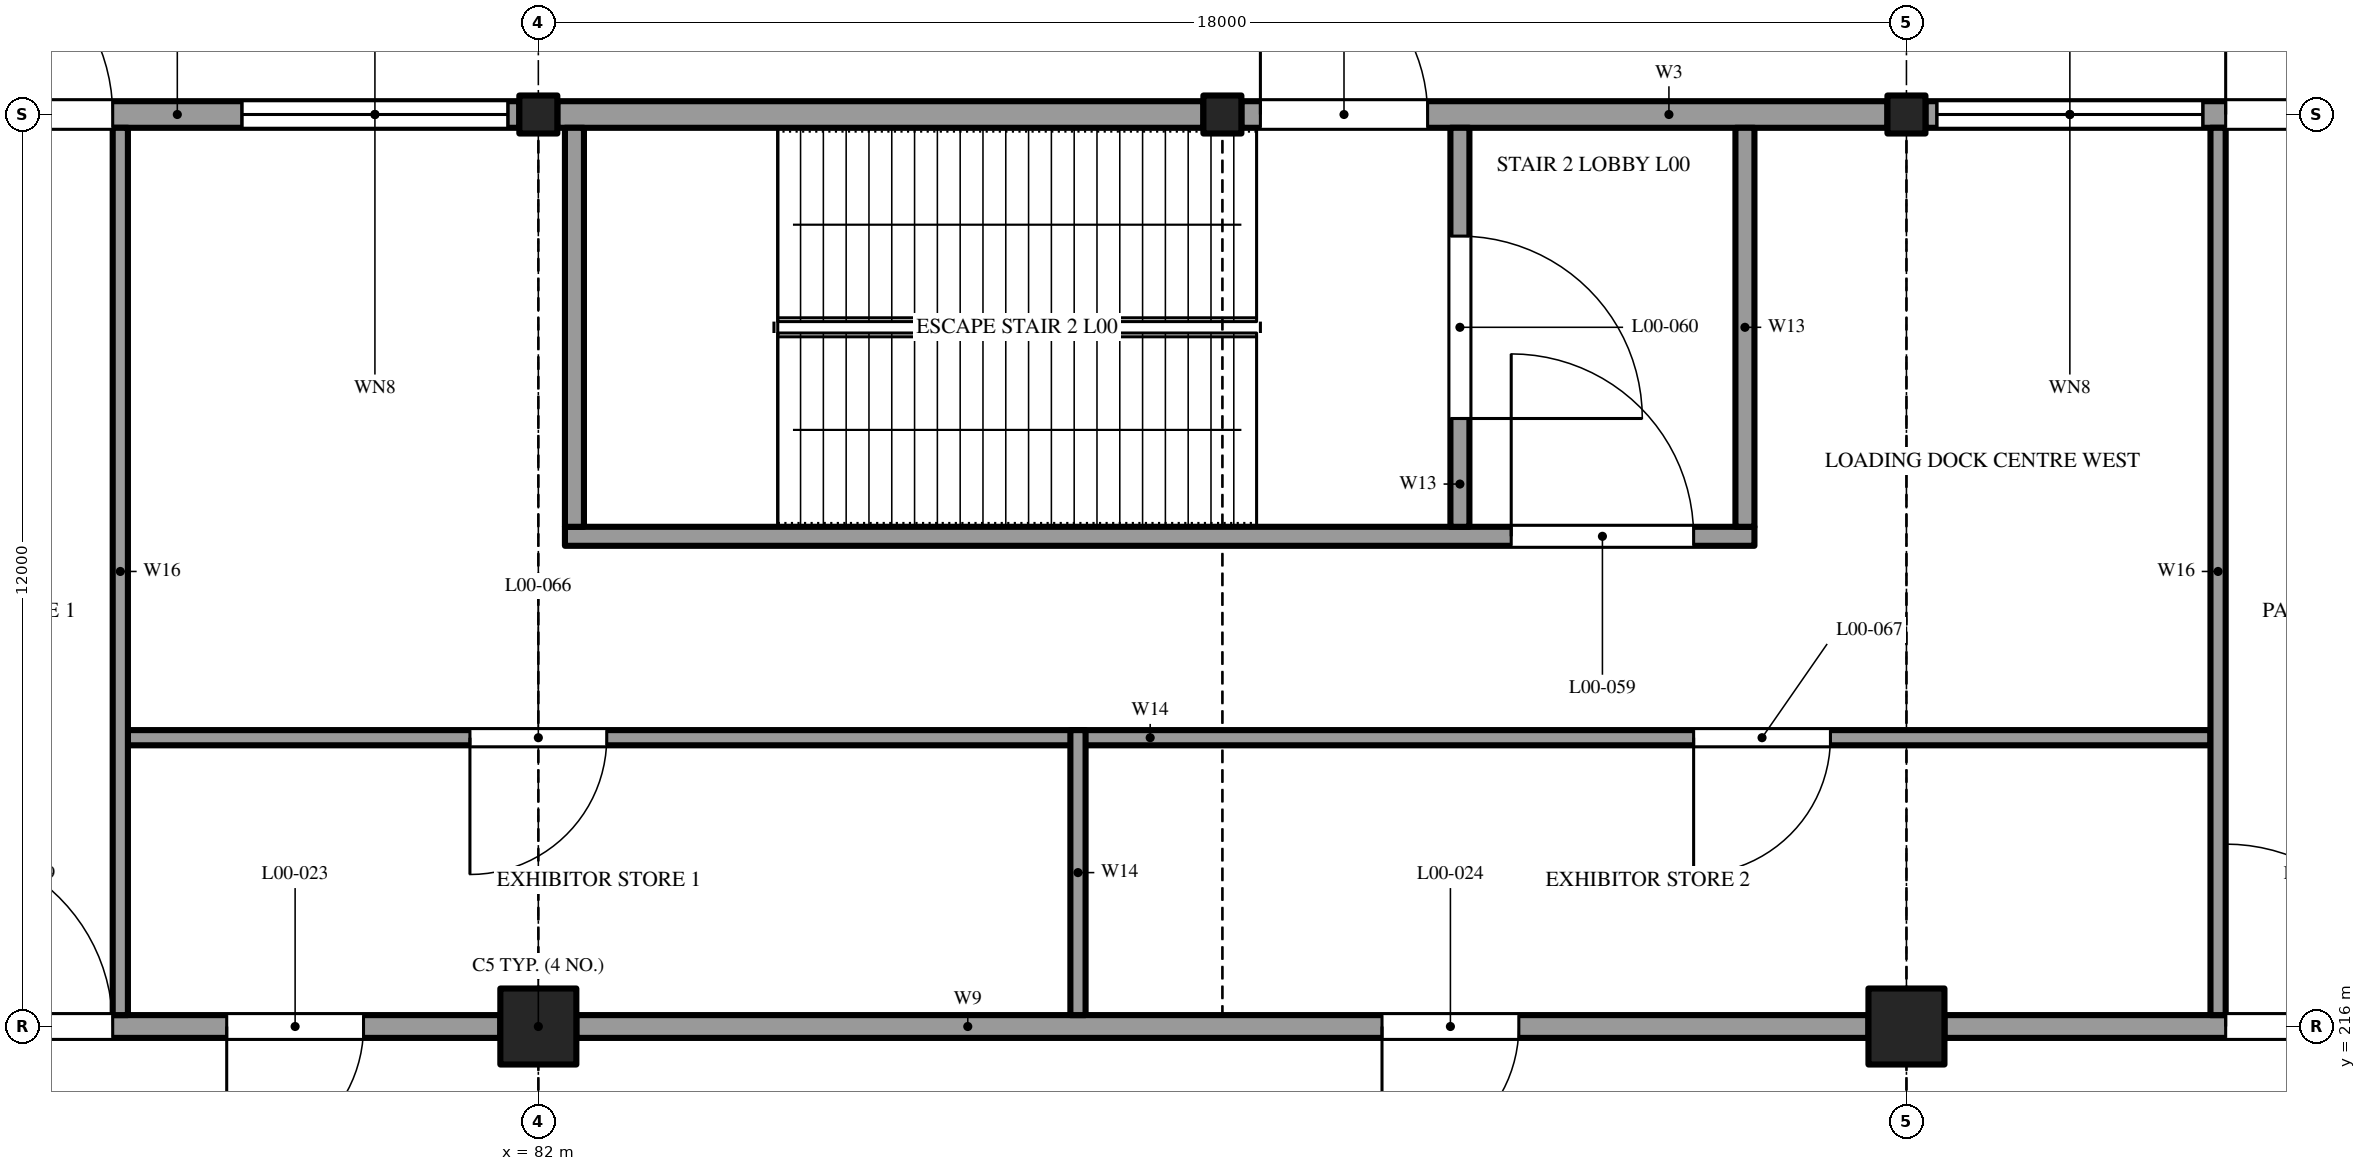
"""IFC4 building model, lengths in metres.
Left out: names, types, materials, properties, quantities, classifications, styles, units other than length and angle.
Written with IfcOpenShell. Run it as: python <this file> out.ifc"""

import sys

from ifc_helpers import new_model, si_unit, direction, frame, frame_2d, origin, origin_2d, place, context, subcontext, project, spatial, rectangle, extrude, element, fill, save


model = new_model("IFC4")
c1 = context("Model", 3, precision=1e-05, world=origin(), true_north=direction((0.0, 1.0)))
c2 = subcontext(c1, "Body", "Model", "MODEL_VIEW")
j1 = project(units=[si_unit("LENGTHUNIT", "METRE"), si_unit("PLANEANGLEUNIT", "RADIAN")], contexts=[c1])
p1 = place(None, origin())
s1 = spatial("IfcSite", under=j1, at=p1, CompositionType="ELEMENT")
p2 = place(p1, origin())
s2 = spatial("IfcBuilding", under=s1, at=p2, CompositionType="ELEMENT")
p3 = place(p2, origin())
s3 = spatial("IfcBuildingStorey", under=s2, at=p3, CompositionType="ELEMENT", Elevation=0.0)
for number, where, z_axis, x_axis in (
    (1, (82.0, 216.0, -0.4), (0.0, 0.0, 1.0), (1.0, 0.0, 0.0)),
    (2, (100.0, 216.0, -0.4), (0.0, 0.0, 1.0), (1.0, 0.0, 0.0)),
):
    element("IfcColumn", number, at=place(p3, frame(where, z_axis=z_axis, x_axis=x_axis)), inside=s3, PredefinedType="COLUMN", context=c2, shape_type="SweptSolid", body=[
        extrude(rectangle(XDim=1.0, YDim=1.0, at=origin_2d()), origin(), (0.0, 0.0, 1.0), 7.6),
    ])
for number, where, z_axis, x_axis in (
    (3, (82.0, 228.0, -0.4), (0.0, 0.0, 1.0), (1.0, 0.0, 0.0)),
    (4, (91.0, 228.0, -0.4), (0.0, 0.0, 1.0), (1.0, 0.0, 0.0)),
    (5, (100.0, 228.0, -0.4), (0.0, 0.0, 1.0), (1.0, 0.0, 0.0)),
):
    element("IfcColumn", number, at=place(p3, frame(where, z_axis=z_axis, x_axis=x_axis)), inside=s3, PredefinedType="COLUMN", context=c2, shape_type="SweptSolid", body=[
        extrude(rectangle(XDim=0.5, YDim=0.5, at=origin_2d()), origin(), (0.0, 0.0, 1.0), 7.6),
    ])
p4 = place(p3, frame((64.5, 216.0, 0.0), z_axis=(0.0, 0.0, 1.0), x_axis=(1.0, 0.0, 0.0)))
e6 = element("IfcWall", 6, at=p4, inside=s3, PredefinedType="SOLIDWALL", context=c2, shape_type="SweptSolid", body=[
    extrude(rectangle(XDim=17.0, YDim=0.3, at=frame_2d((8.5, 0.0))), origin(), (0.0, 0.0, 1.0), 6.8),
])
p5 = place(p4, frame((13.4, 0.0, 0.0)))
e7 = element("IfcOpeningElement", 7, at=p5, cuts=e6, PredefinedType="OPENING", context=c2, shape_type="SweptSolid", body=[
    extrude(rectangle(XDim=1.8, YDim=2.4, at=frame_2d((0.9, 1.2))), frame((0.0, 0.16, 0.0), z_axis=(0.0, -1.0, 0.0), x_axis=(1.0, 0.0, 0.0)), (0.0, 0.0, 1.0), 0.32),
])
p6 = place(p4, frame((1.5, 0.0, 0.0)))
e8 = element("IfcOpeningElement", 8, at=p6, cuts=e6, PredefinedType="OPENING", context=c2, shape_type="SweptSolid", body=[
    extrude(rectangle(XDim=5.0, YDim=5.5, at=frame_2d((2.5, 2.75))), frame((0.0, 0.16, 0.0), z_axis=(0.0, -1.0, 0.0), x_axis=(1.0, 0.0, 0.0)), (0.0, 0.0, 1.0), 0.32),
])
p7 = place(p4, frame((9.5, 0.0, 0.0)))
e9 = element("IfcOpeningElement", 9, at=p7, cuts=e6, PredefinedType="OPENING", context=c2, shape_type="SweptSolid", body=[
    extrude(rectangle(XDim=2.4, YDim=2.4, at=frame_2d((1.2, 1.2))), frame((0.0, 0.16, 0.0), z_axis=(0.0, -1.0, 0.0), x_axis=(1.0, 0.0, 0.0)), (0.0, 0.0, 1.0), 0.32),
])
p8 = place(p3, frame((82.5, 216.0, 0.0), z_axis=(0.0, 0.0, 1.0), x_axis=(1.0, 0.0, 0.0)))
e10 = element("IfcWall", 10, at=p8, inside=s3, PredefinedType="SOLIDWALL", context=c2, shape_type="SweptSolid", body=[
    extrude(rectangle(XDim=17.0, YDim=0.3, at=frame_2d((8.5, 0.0))), origin(), (0.0, 0.0, 1.0), 6.8),
])
p9 = place(p8, frame((10.6, 0.0, 0.0)))
e11 = element("IfcOpeningElement", 11, at=p9, cuts=e10, PredefinedType="OPENING", context=c2, shape_type="SweptSolid", body=[
    extrude(rectangle(XDim=1.8, YDim=2.4, at=frame_2d((0.9, 1.2))), frame((0.0, 0.16, 0.0), z_axis=(0.0, -1.0, 0.0), x_axis=(1.0, 0.0, 0.0)), (0.0, 0.0, 1.0), 0.32),
])
p10 = place(p3, frame((100.5, 216.0, 0.0), z_axis=(0.0, 0.0, 1.0), x_axis=(1.0, 0.0, 0.0)))
e12 = element("IfcWall", 12, at=p10, inside=s3, PredefinedType="SOLIDWALL", context=c2, shape_type="SweptSolid", body=[
    extrude(rectangle(XDim=17.0, YDim=0.3, at=frame_2d((8.5, 0.0))), origin(), (0.0, 0.0, 1.0), 6.8),
])
p11 = place(p10, frame((10.6, 0.0, 0.0)))
e13 = element("IfcOpeningElement", 13, at=p11, cuts=e12, PredefinedType="OPENING", context=c2, shape_type="SweptSolid", body=[
    extrude(rectangle(XDim=1.8, YDim=2.4, at=frame_2d((0.9, 1.2))), frame((0.0, 0.16, 0.0), z_axis=(0.0, -1.0, 0.0), x_axis=(1.0, 0.0, 0.0)), (0.0, 0.0, 1.0), 0.32),
])
p12 = place(p10, frame((3.7, 0.0, 0.0)))
e14 = element("IfcOpeningElement", 14, at=p12, cuts=e12, PredefinedType="OPENING", context=c2, shape_type="SweptSolid", body=[
    extrude(rectangle(XDim=2.4, YDim=2.4, at=frame_2d((1.2, 1.2))), frame((0.0, 0.16, 0.0), z_axis=(0.0, -1.0, 0.0), x_axis=(1.0, 0.0, 0.0)), (0.0, 0.0, 1.0), 0.32),
])
p13 = place(p3, frame((73.25, 228.0, 0.0), z_axis=(0.0, 0.0, 1.0), x_axis=(1.0, 0.0, 0.0)))
e15 = element("IfcWall", 15, at=p13, inside=s3, PredefinedType="SOLIDWALL", context=c2, shape_type="SweptSolid", body=[
    extrude(rectangle(XDim=8.5, YDim=0.35, at=frame_2d((4.25, 0.0))), origin(), (0.0, 0.0, 1.0), 6.8),
])
p14 = place(p13, frame((4.85, 0.0, 0.0)))
e16 = element("IfcOpeningElement", 16, at=p14, cuts=e15, PredefinedType="OPENING", context=c2, shape_type="SweptSolid", body=[
    extrude(rectangle(XDim=3.5, YDim=4.2, at=frame_2d((1.75, 2.1))), frame((0.0, 0.185, 0.0), z_axis=(0.0, -1.0, 0.0), x_axis=(1.0, 0.0, 0.0)), (0.0, 0.0, 1.0), 0.37),
])
p15 = place(p13, frame((4.85, 0.0, 4.9)))
e17 = element("IfcOpeningElement", 17, at=p15, cuts=e15, PredefinedType="OPENING", context=c2, shape_type="SweptSolid", body=[
    extrude(rectangle(XDim=3.5, YDim=1.7, at=frame_2d((1.75, 0.85))), frame((0.0, 0.185, 0.0), z_axis=(0.0, -1.0, 0.0), x_axis=(1.0, 0.0, 0.0)), (0.0, 0.0, 1.0), 0.37),
])
p16 = place(p13, frame((0.75, 0.0, 0.0)))
e18 = element("IfcOpeningElement", 18, at=p16, cuts=e15, PredefinedType="OPENING", context=c2, shape_type="SweptSolid", body=[
    extrude(rectangle(XDim=2.4, YDim=2.2, at=frame_2d((1.2, 1.1))), frame((0.0, 0.185, 0.0), z_axis=(0.0, -1.0, 0.0), x_axis=(1.0, 0.0, 0.0)), (0.0, 0.0, 1.0), 0.37),
])
p17 = place(p3, frame((82.25, 228.0, 0.0), z_axis=(0.0, 0.0, 1.0), x_axis=(1.0, 0.0, 0.0)))
e19 = element("IfcWall", 19, at=p17, inside=s3, PredefinedType="SOLIDWALL", context=c2, shape_type="SweptSolid", body=[
    extrude(rectangle(XDim=8.5, YDim=0.35, at=frame_2d((4.25, 0.0))), origin(), (0.0, 0.0, 1.0), 6.8),
])
p18 = place(p3, frame((91.25, 228.0, 0.0), z_axis=(0.0, 0.0, 1.0), x_axis=(1.0, 0.0, 0.0)))
e20 = element("IfcWall", 20, at=p18, inside=s3, PredefinedType="SOLIDWALL", context=c2, shape_type="SweptSolid", body=[
    extrude(rectangle(XDim=8.5, YDim=0.35, at=frame_2d((4.25, 0.0))), origin(), (0.0, 0.0, 1.0), 6.8),
])
p19 = place(p18, frame((0.25, 0.0, 0.0)))
e21 = element("IfcOpeningElement", 21, at=p19, cuts=e20, PredefinedType="OPENING", context=c2, shape_type="SweptSolid", body=[
    extrude(rectangle(XDim=2.2, YDim=2.2, at=frame_2d((1.1, 1.1))), frame((0.0, 0.185, 0.0), z_axis=(0.0, -1.0, 0.0), x_axis=(1.0, 0.0, 0.0)), (0.0, 0.0, 1.0), 0.37),
])
p20 = place(p3, frame((100.25, 228.0, 0.0), z_axis=(0.0, 0.0, 1.0), x_axis=(1.0, 0.0, 0.0)))
e22 = element("IfcWall", 22, at=p20, inside=s3, PredefinedType="SOLIDWALL", context=c2, shape_type="SweptSolid", body=[
    extrude(rectangle(XDim=8.5, YDim=0.35, at=frame_2d((4.25, 0.0))), origin(), (0.0, 0.0, 1.0), 6.8),
])
p21 = place(p20, frame((0.15, 0.0, 0.0)))
e23 = element("IfcOpeningElement", 23, at=p21, cuts=e22, PredefinedType="OPENING", context=c2, shape_type="SweptSolid", body=[
    extrude(rectangle(XDim=3.5, YDim=4.2, at=frame_2d((1.75, 2.1))), frame((0.0, 0.185, 0.0), z_axis=(0.0, -1.0, 0.0), x_axis=(1.0, 0.0, 0.0)), (0.0, 0.0, 1.0), 0.37),
])
p22 = place(p20, frame((0.15, 0.0, 4.9)))
e24 = element("IfcOpeningElement", 24, at=p22, cuts=e22, PredefinedType="OPENING", context=c2, shape_type="SweptSolid", body=[
    extrude(rectangle(XDim=3.5, YDim=1.7, at=frame_2d((1.75, 0.85))), frame((0.0, 0.185, 0.0), z_axis=(0.0, -1.0, 0.0), x_axis=(1.0, 0.0, 0.0)), (0.0, 0.0, 1.0), 0.37),
])
p23 = place(p20, frame((3.95, 0.0, 0.0)))
e25 = element("IfcOpeningElement", 25, at=p23, cuts=e22, PredefinedType="OPENING", context=c2, shape_type="SweptSolid", body=[
    extrude(rectangle(XDim=2.4, YDim=2.2, at=frame_2d((1.2, 1.1))), frame((0.0, 0.185, 0.0), z_axis=(0.0, -1.0, 0.0), x_axis=(1.0, 0.0, 0.0)), (0.0, 0.0, 1.0), 0.37),
])
p24 = place(p3, frame((82.35, 222.45, 0.0), z_axis=(0.0, 0.0, 1.0), x_axis=(1.0, 0.0, 0.0)))
e26 = element("IfcWall", 26, at=p24, inside=s3, PredefinedType="SOLIDWALL", context=c2, shape_type="SweptSolid", body=[
    extrude(rectangle(XDim=15.65, YDim=0.25, at=frame_2d((7.825, 0.0))), origin(), (0.0, 0.0, 1.0), 6.8),
])
p25 = place(p24, frame((12.45, 0.0, 0.0)))
e27 = element("IfcOpeningElement", 27, at=p25, cuts=e26, PredefinedType="OPENING", context=c2, shape_type="SweptSolid", body=[
    extrude(rectangle(XDim=2.4, YDim=2.2, at=frame_2d((1.2, 1.1))), frame((0.0, 0.135, 0.0), z_axis=(0.0, -1.0, 0.0), x_axis=(1.0, 0.0, 0.0)), (0.0, 0.0, 1.0), 0.27),
])
p26 = place(p3, frame((94.125, 222.575, 0.0), z_axis=(0.0, 0.0, 1.0), x_axis=(0.0, 1.0, 0.0)))
e28 = element("IfcWall", 28, at=p26, inside=s3, PredefinedType="SOLIDWALL", context=c2, shape_type="SweptSolid", body=[
    extrude(rectangle(XDim=5.25, YDim=0.25, at=frame_2d((2.625, 0.0))), origin(), (0.0, 0.0, 1.0), 6.8),
])
p27 = place(p26, frame((1.425, 0.0, 0.0)))
e29 = element("IfcOpeningElement", 29, at=p27, cuts=e28, PredefinedType="OPENING", context=c2, shape_type="SweptSolid", body=[
    extrude(rectangle(XDim=2.4, YDim=2.2, at=frame_2d((1.2, 1.1))), frame((0.0, 0.135, 0.0), z_axis=(0.0, -1.0, 0.0), x_axis=(1.0, 0.0, 0.0)), (0.0, 0.0, 1.0), 0.27),
])
for number, where, z_axis, x_axis in (
    (30, (82.475, 222.575, 0.0), (0.0, 0.0, 1.0), (0.0, 1.0, 0.0)),
    (31, (97.875, 222.575, 0.0), (0.0, 0.0, 1.0), (0.0, 1.0, 0.0)),
):
    element("IfcWall", number, at=place(p3, frame(where, z_axis=z_axis, x_axis=x_axis)), inside=s3, PredefinedType="SOLIDWALL", context=c2, shape_type="SweptSolid", body=[
        extrude(rectangle(XDim=5.25, YDim=0.25, at=frame_2d((2.625, 0.0))), origin(), (0.0, 0.0, 1.0), 6.8),
    ])
p28 = place(p3, frame((76.6, 219.8, 0.0), z_axis=(0.0, 0.0, 1.0), x_axis=(1.0, 0.0, 0.0)))
e32 = element("IfcWall", 32, at=p28, inside=s3, PredefinedType="SOLIDWALL", context=c2, shape_type="SweptSolid", body=[
    extrude(rectangle(XDim=27.4, YDim=0.2, at=frame_2d((13.7, 0.0))), origin(), (0.0, 0.0, 1.0), 6.8),
])
p29 = place(p28, frame((4.5, 0.0, 0.0)))
e33 = element("IfcOpeningElement", 33, at=p29, cuts=e32, PredefinedType="OPENING", context=c2, shape_type="SweptSolid", body=[
    extrude(rectangle(XDim=1.8, YDim=2.4, at=frame_2d((0.9, 1.2))), frame((0.0, 0.11, 0.0), z_axis=(0.0, -1.0, 0.0), x_axis=(1.0, 0.0, 0.0)), (0.0, 0.0, 1.0), 0.22),
])
p30 = place(p28, frame((20.6, 0.0, 0.0)))
e34 = element("IfcOpeningElement", 34, at=p30, cuts=e32, PredefinedType="OPENING", context=c2, shape_type="SweptSolid", body=[
    extrude(rectangle(XDim=1.8, YDim=2.4, at=frame_2d((0.9, 1.2))), frame((0.0, 0.11, 0.0), z_axis=(0.0, -1.0, 0.0), x_axis=(1.0, 0.0, 0.0)), (0.0, 0.0, 1.0), 0.22),
])
p31 = place(p3, frame((89.1, 216.15, 0.0), z_axis=(0.0, 0.0, 1.0), x_axis=(0.0, 1.0, 0.0)))
e35 = element("IfcWall", 35, at=p31, inside=s3, PredefinedType="SOLIDWALL", context=c2, shape_type="SweptSolid", body=[
    extrude(rectangle(XDim=3.75, YDim=0.2, at=frame_2d((1.875, 0.0))), origin(), (0.0, 0.0, 1.0), 6.8),
])
for number, where, z_axis, x_axis in (
    (36, (76.5, 216.15, 0.0), (0.0, 0.0, 1.0), (0.0, 1.0, 0.0)),
    (37, (104.1, 216.15, 0.0), (0.0, 0.0, 1.0), (0.0, 1.0, 0.0)),
):
    element("IfcWall", number, at=place(p3, frame(where, z_axis=z_axis, x_axis=x_axis)), inside=s3, PredefinedType="SOLIDWALL", context=c2, shape_type="SweptSolid", body=[
        extrude(rectangle(XDim=11.675, YDim=0.2, at=frame_2d((5.837, 0.0))), origin(), (0.0, 0.0, 1.0), 6.8),
    ])
p32 = place(p5, frame((1.8, 0.0, 0.0), z_axis=(0.0, 0.0, 1.0), x_axis=(-1.0, 0.0, 0.0)))
e38 = element("IfcDoor", 38, at=p32, inside=s3, OperationType="DOUBLE_DOOR_SINGLE_SWING", PredefinedType="DOOR", context=c2, shape_type="SweptSolid", body=[
    extrude(rectangle(XDim=1.8, YDim=2.4, at=frame_2d((0.9, 1.2))), frame((0.0, 0.025, 0.0), z_axis=(0.0, -1.0, 0.0), x_axis=(1.0, 0.0, 0.0)), (0.0, 0.0, 1.0), 0.05),
])
fill(e7, e38)
p33 = place(p9, frame((1.8, 0.0, 0.0), z_axis=(0.0, 0.0, 1.0), x_axis=(-1.0, 0.0, 0.0)))
e39 = element("IfcDoor", 39, at=p33, inside=s3, OperationType="DOUBLE_DOOR_SINGLE_SWING", PredefinedType="DOOR", context=c2, shape_type="SweptSolid", body=[
    extrude(rectangle(XDim=1.8, YDim=2.4, at=frame_2d((0.9, 1.2))), frame((0.0, 0.025, 0.0), z_axis=(0.0, -1.0, 0.0), x_axis=(1.0, 0.0, 0.0)), (0.0, 0.0, 1.0), 0.05),
])
fill(e11, e39)
p34 = place(p7, origin())
e40 = element("IfcDoor", 40, at=p34, inside=s3, OperationType="DOUBLE_DOOR_SINGLE_SWING", PredefinedType="DOOR", context=c2, shape_type="SweptSolid", body=[
    extrude(rectangle(XDim=2.4, YDim=2.4, at=frame_2d((1.2, 1.2))), frame((0.0, 0.025, 0.0), z_axis=(0.0, -1.0, 0.0), x_axis=(1.0, 0.0, 0.0)), (0.0, 0.0, 1.0), 0.05),
])
fill(e9, e40)
p35 = place(p12, origin())
e41 = element("IfcDoor", 41, at=p35, inside=s3, OperationType="DOUBLE_DOOR_SINGLE_SWING", PredefinedType="DOOR", context=c2, shape_type="SweptSolid", body=[
    extrude(rectangle(XDim=2.4, YDim=2.4, at=frame_2d((1.2, 1.2))), frame((0.0, 0.025, 0.0), z_axis=(0.0, -1.0, 0.0), x_axis=(1.0, 0.0, 0.0)), (0.0, 0.0, 1.0), 0.05),
])
fill(e14, e41)
p36 = place(p14, origin())
e42 = element("IfcDoor", 42, at=p36, inside=s3, OperationType="ROLLINGUP", PredefinedType="DOOR", context=c2, shape_type="SweptSolid", body=[
    extrude(rectangle(XDim=3.5, YDim=4.2, at=frame_2d((1.75, 2.1))), frame((0.0, 0.025, 0.0), z_axis=(0.0, -1.0, 0.0), x_axis=(1.0, 0.0, 0.0)), (0.0, 0.0, 1.0), 0.05),
])
fill(e16, e42)
p37 = place(p15, origin())
e43 = element("IfcWindow", 43, at=p37, inside=s3, PartitioningType="SINGLE_PANEL", PredefinedType="WINDOW", context=c2, shape_type="SweptSolid", body=[
    extrude(rectangle(XDim=3.5, YDim=1.7, at=frame_2d((1.75, 0.85))), frame((0.0, 0.03, 0.0), z_axis=(0.0, -1.0, 0.0), x_axis=(1.0, 0.0, 0.0)), (0.0, 0.0, 1.0), 0.06),
])
fill(e17, e43)
p38 = place(p21, origin())
e44 = element("IfcDoor", 44, at=p38, inside=s3, OperationType="ROLLINGUP", PredefinedType="DOOR", context=c2, shape_type="SweptSolid", body=[
    extrude(rectangle(XDim=3.5, YDim=4.2, at=frame_2d((1.75, 2.1))), frame((0.0, 0.025, 0.0), z_axis=(0.0, -1.0, 0.0), x_axis=(1.0, 0.0, 0.0)), (0.0, 0.0, 1.0), 0.05),
])
fill(e23, e44)
p39 = place(p22, origin())
e45 = element("IfcWindow", 45, at=p39, inside=s3, PartitioningType="SINGLE_PANEL", PredefinedType="WINDOW", context=c2, shape_type="SweptSolid", body=[
    extrude(rectangle(XDim=3.5, YDim=1.7, at=frame_2d((1.75, 0.85))), frame((0.0, 0.03, 0.0), z_axis=(0.0, -1.0, 0.0), x_axis=(1.0, 0.0, 0.0)), (0.0, 0.0, 1.0), 0.06),
])
fill(e24, e45)
p40 = place(p19, origin())
e46 = element("IfcDoor", 46, at=p40, inside=s3, OperationType="DOUBLE_DOOR_SINGLE_SWING", PredefinedType="DOOR", context=c2, shape_type="SweptSolid", body=[
    extrude(rectangle(XDim=2.2, YDim=2.2, at=frame_2d((1.1, 1.1))), frame((0.0, 0.025, 0.0), z_axis=(0.0, -1.0, 0.0), x_axis=(1.0, 0.0, 0.0)), (0.0, 0.0, 1.0), 0.05),
])
fill(e21, e46)
p41 = place(p16, origin())
e47 = element("IfcDoor", 47, at=p41, inside=s3, OperationType="DOUBLE_DOOR_SINGLE_SWING", PredefinedType="DOOR", context=c2, shape_type="SweptSolid", body=[
    extrude(rectangle(XDim=2.4, YDim=2.2, at=frame_2d((1.2, 1.1))), frame((0.0, 0.025, 0.0), z_axis=(0.0, -1.0, 0.0), x_axis=(1.0, 0.0, 0.0)), (0.0, 0.0, 1.0), 0.05),
])
fill(e18, e47)
p42 = place(p23, origin())
e48 = element("IfcDoor", 48, at=p42, inside=s3, OperationType="DOUBLE_DOOR_SINGLE_SWING", PredefinedType="DOOR", context=c2, shape_type="SweptSolid", body=[
    extrude(rectangle(XDim=2.4, YDim=2.2, at=frame_2d((1.2, 1.1))), frame((0.0, 0.025, 0.0), z_axis=(0.0, -1.0, 0.0), x_axis=(1.0, 0.0, 0.0)), (0.0, 0.0, 1.0), 0.05),
])
fill(e25, e48)
p43 = place(p25, origin())
e49 = element("IfcDoor", 49, at=p43, inside=s3, OperationType="DOUBLE_DOOR_SINGLE_SWING", PredefinedType="DOOR", context=c2, shape_type="SweptSolid", body=[
    extrude(rectangle(XDim=2.4, YDim=2.2, at=frame_2d((1.2, 1.1))), frame((0.0, 0.025, 0.0), z_axis=(0.0, -1.0, 0.0), x_axis=(1.0, 0.0, 0.0)), (0.0, 0.0, 1.0), 0.05),
])
fill(e27, e49)
p44 = place(p27, frame((2.4, 0.0, 0.0), z_axis=(0.0, 0.0, 1.0), x_axis=(-1.0, 0.0, 0.0)))
e50 = element("IfcDoor", 50, at=p44, inside=s3, OperationType="DOUBLE_DOOR_SINGLE_SWING", PredefinedType="DOOR", context=c2, shape_type="SweptSolid", body=[
    extrude(rectangle(XDim=2.4, YDim=2.2, at=frame_2d((1.2, 1.1))), frame((0.0, 0.025, 0.0), z_axis=(0.0, -1.0, 0.0), x_axis=(1.0, 0.0, 0.0)), (0.0, 0.0, 1.0), 0.05),
])
fill(e29, e50)
p45 = place(p29, frame((1.8, 0.0, 0.0), z_axis=(0.0, 0.0, 1.0), x_axis=(-1.0, 0.0, 0.0)))
e51 = element("IfcDoor", 51, at=p45, inside=s3, OperationType="DOUBLE_DOOR_SINGLE_SWING", PredefinedType="DOOR", context=c2, shape_type="SweptSolid", body=[
    extrude(rectangle(XDim=1.8, YDim=2.4, at=frame_2d((0.9, 1.2))), frame((0.0, 0.025, 0.0), z_axis=(0.0, -1.0, 0.0), x_axis=(1.0, 0.0, 0.0)), (0.0, 0.0, 1.0), 0.05),
])
fill(e33, e51)
p46 = place(p30, frame((1.8, 0.0, 0.0), z_axis=(0.0, 0.0, 1.0), x_axis=(-1.0, 0.0, 0.0)))
e52 = element("IfcDoor", 52, at=p46, inside=s3, OperationType="DOUBLE_DOOR_SINGLE_SWING", PredefinedType="DOOR", context=c2, shape_type="SweptSolid", body=[
    extrude(rectangle(XDim=1.8, YDim=2.4, at=frame_2d((0.9, 1.2))), frame((0.0, 0.025, 0.0), z_axis=(0.0, -1.0, 0.0), x_axis=(1.0, 0.0, 0.0)), (0.0, 0.0, 1.0), 0.05),
])
fill(e34, e52)
save(model, sys.argv[1])
